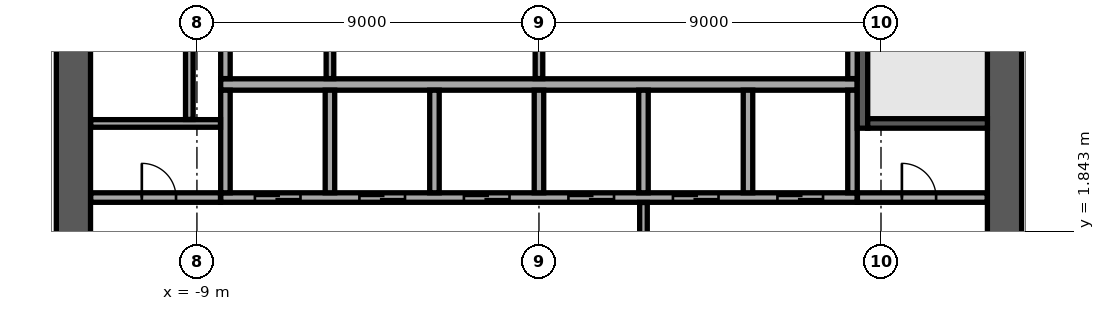
"""IFC4 building model, lengths in metres.
Left out: names, types, materials, properties, quantities, classifications, styles, units other than length and angle.
Written with IfcOpenShell. Run it as: python <this file> out.ifc"""

import sys

from ifc_helpers import new_model, si_unit, direction, frame, frame_2d, origin, place, context, subcontext, project, spatial, rectangle, extrude, element, fill, save


model = new_model("IFC4")
c1 = context("Model", 3, precision=1e-05, world=origin(), true_north=direction((0.0, 1.0)))
c2 = subcontext(c1, "Body", "Model", "MODEL_VIEW")
j1 = project(units=[si_unit("LENGTHUNIT", "METRE"), si_unit("PLANEANGLEUNIT", "RADIAN")], contexts=[c1])
p1 = place(None, origin())
s1 = spatial("IfcSite", under=j1, at=p1, CompositionType="ELEMENT")
p2 = place(p1, origin())
s2 = spatial("IfcBuilding", under=s1, at=p2, CompositionType="ELEMENT")
p3 = place(p2, frame((0.0, 0.0, 205.3)))
s3 = spatial("IfcBuildingStorey", under=s2, at=p3, CompositionType="ELEMENT", Elevation=205.3)
p4 = place(p3, frame((12.25, -11.8, 0.0), z_axis=(0.0, 0.0, 1.0), x_axis=(0.0, 1.0, 0.0)))
e1 = element("IfcWall", 1, at=p4, inside=s3, PredefinedType="SHEAR", context=c2, shape_type="SweptSolid", body=[
    extrude(rectangle(XDim=23.6, YDim=0.9, at=frame_2d((11.8, 0.0))), origin(), (0.0, 0.0, 1.0), 3.62),
])
p5 = place(p4, frame((10.6, 0.0, 0.0)))
e2 = element("IfcOpeningElement", 2, at=p5, cuts=e1, PredefinedType="OPENING", context=c2, shape_type="SweptSolid", body=[
    extrude(rectangle(XDim=2.4, YDim=2.4, at=frame_2d((1.2, 1.2))), frame((0.0, 0.46, 0.0), z_axis=(0.0, -1.0, 0.0), x_axis=(1.0, 0.0, 0.0)), (0.0, 0.0, 1.0), 0.92),
])
p6 = place(p3, frame((-12.25, -11.8, 0.0), z_axis=(0.0, 0.0, 1.0), x_axis=(0.0, 1.0, 0.0)))
e3 = element("IfcWall", 3, at=p6, inside=s3, PredefinedType="SHEAR", context=c2, shape_type="SweptSolid", body=[
    extrude(rectangle(XDim=23.6, YDim=0.9, at=frame_2d((11.8, 0.0))), origin(), (0.0, 0.0, 1.0), 3.62),
])
p7 = place(p6, frame((10.6, 0.0, 0.0)))
e4 = element("IfcOpeningElement", 4, at=p7, cuts=e3, PredefinedType="OPENING", context=c2, shape_type="SweptSolid", body=[
    extrude(rectangle(XDim=2.4, YDim=2.4, at=frame_2d((1.2, 1.2))), frame((0.0, 0.46, 0.0), z_axis=(0.0, -1.0, 0.0), x_axis=(1.0, 0.0, 0.0)), (0.0, 0.0, 1.0), 0.92),
])
p8 = place(p3, frame((-8.375, 5.7, 0.0), z_axis=(0.0, 0.0, 1.0), x_axis=(1.0, 0.0, 0.0)))
e5 = element("IfcWall", 5, at=p8, inside=s3, PredefinedType="SOLIDWALL", context=c2, shape_type="SweptSolid", body=[
    extrude(rectangle(XDim=16.75, YDim=0.3, at=frame_2d((8.375, 0.0))), origin(), (0.0, 0.0, 1.0), 3.62),
])
p9 = place(p3, frame((-8.375, 2.725, 0.0), z_axis=(0.0, 0.0, 1.0), x_axis=(1.0, 0.0, 0.0)))
e6 = element("IfcWall", 6, at=p9, inside=s3, PredefinedType="SOLIDWALL", context=c2, shape_type="SweptSolid", body=[
    extrude(rectangle(XDim=16.75, YDim=0.25, at=frame_2d((8.375, 0.0))), origin(), (0.0, 0.0, 1.0), 3.62),
])
p10 = place(p9, frame((0.9, 0.0, 0.0)))
e7 = element("IfcOpeningElement", 7, at=p10, cuts=e6, PredefinedType="OPENING", context=c2, shape_type="SweptSolid", body=[
    extrude(rectangle(XDim=1.2, YDim=2.1, at=frame_2d((0.6, 1.05))), frame((0.0, 0.135, 0.0), z_axis=(0.0, -1.0, 0.0), x_axis=(1.0, 0.0, 0.0)), (0.0, 0.0, 1.0), 0.27),
])
p11 = place(p9, frame((3.65, 0.0, 0.0)))
e8 = element("IfcOpeningElement", 8, at=p11, cuts=e6, PredefinedType="OPENING", context=c2, shape_type="SweptSolid", body=[
    extrude(rectangle(XDim=1.2, YDim=2.1, at=frame_2d((0.6, 1.05))), frame((0.0, 0.135, 0.0), z_axis=(0.0, -1.0, 0.0), x_axis=(1.0, 0.0, 0.0)), (0.0, 0.0, 1.0), 0.27),
])
p12 = place(p9, frame((6.4, 0.0, 0.0)))
e9 = element("IfcOpeningElement", 9, at=p12, cuts=e6, PredefinedType="OPENING", context=c2, shape_type="SweptSolid", body=[
    extrude(rectangle(XDim=1.2, YDim=2.1, at=frame_2d((0.6, 1.05))), frame((0.0, 0.135, 0.0), z_axis=(0.0, -1.0, 0.0), x_axis=(1.0, 0.0, 0.0)), (0.0, 0.0, 1.0), 0.27),
])
p13 = place(p9, frame((9.15, 0.0, 0.0)))
e10 = element("IfcOpeningElement", 10, at=p13, cuts=e6, PredefinedType="OPENING", context=c2, shape_type="SweptSolid", body=[
    extrude(rectangle(XDim=1.2, YDim=2.1, at=frame_2d((0.6, 1.05))), frame((0.0, 0.135, 0.0), z_axis=(0.0, -1.0, 0.0), x_axis=(1.0, 0.0, 0.0)), (0.0, 0.0, 1.0), 0.27),
])
p14 = place(p9, frame((11.9, 0.0, 0.0)))
e11 = element("IfcOpeningElement", 11, at=p14, cuts=e6, PredefinedType="OPENING", context=c2, shape_type="SweptSolid", body=[
    extrude(rectangle(XDim=1.2, YDim=2.1, at=frame_2d((0.6, 1.05))), frame((0.0, 0.135, 0.0), z_axis=(0.0, -1.0, 0.0), x_axis=(1.0, 0.0, 0.0)), (0.0, 0.0, 1.0), 0.27),
])
p15 = place(p9, frame((14.65, 0.0, 0.0)))
e12 = element("IfcOpeningElement", 12, at=p15, cuts=e6, PredefinedType="OPENING", context=c2, shape_type="SweptSolid", body=[
    extrude(rectangle(XDim=1.2, YDim=2.1, at=frame_2d((0.6, 1.05))), frame((0.0, 0.135, 0.0), z_axis=(0.0, -1.0, 0.0), x_axis=(1.0, 0.0, 0.0)), (0.0, 0.0, 1.0), 0.27),
])
for number, where, z_axis, x_axis in (
    (13, (-8.25, 2.85, 0.0), (0.0, 0.0, 1.0), (0.0, 1.0, 0.0)),
    (14, (-5.5, 2.85, 0.0), (0.0, 0.0, 1.0), (0.0, 1.0, 0.0)),
    (15, (-2.75, 2.85, 0.0), (0.0, 0.0, 1.0), (0.0, 1.0, 0.0)),
    (16, (0.0, 2.85, 0.0), (0.0, 0.0, 1.0), (0.0, 1.0, 0.0)),
    (17, (2.75, 2.85, 0.0), (0.0, 0.0, 1.0), (0.0, 1.0, 0.0)),
    (18, (5.5, 2.85, 0.0), (0.0, 0.0, 1.0), (0.0, 1.0, 0.0)),
    (19, (8.25, 2.85, 0.0), (0.0, 0.0, 1.0), (0.0, 1.0, 0.0)),
):
    element("IfcWall", number, at=place(p3, frame(where, z_axis=z_axis, x_axis=x_axis)), inside=s3, PredefinedType="SOLIDWALL", context=c2, shape_type="SweptSolid", body=[
        extrude(rectangle(XDim=2.7, YDim=0.25, at=frame_2d((1.35, 0.0))), origin(), (0.0, 0.0, 1.0), 3.62),
    ])
p16 = place(p3, frame((8.512, 4.55, 0.0), z_axis=(0.0, 0.0, 1.0), x_axis=(0.0, 1.0, 0.0)))
e20 = element("IfcWall", 20, at=p16, inside=s3, PredefinedType="SOLIDWALL", context=c2, shape_type="SweptSolid", body=[
    extrude(rectangle(XDim=7.25, YDim=0.275, at=frame_2d((3.625, 0.0))), origin(), (0.0, 0.0, 1.0), 3.62),
])
p17 = place(p16, frame((6.0, 0.0, 0.0)))
e21 = element("IfcOpeningElement", 21, at=p17, cuts=e20, PredefinedType="OPENING", context=c2, shape_type="SweptSolid", body=[
    extrude(rectangle(XDim=1.0, YDim=2.1, at=frame_2d((0.5, 1.05))), frame((0.0, 0.147, 0.0), z_axis=(0.0, -1.0, 0.0), x_axis=(1.0, 0.0, 0.0)), (0.0, 0.0, 1.0), 0.295),
])
p18 = place(p3, frame((8.65, 4.675, 0.0), z_axis=(0.0, 0.0, 1.0), x_axis=(1.0, 0.0, 0.0)))
e22 = element("IfcWall", 22, at=p18, inside=s3, PredefinedType="SOLIDWALL", context=c2, shape_type="SweptSolid", body=[
    extrude(rectangle(XDim=3.15, YDim=0.25, at=frame_2d((1.575, 0.0))), origin(), (0.0, 0.0, 1.0), 3.62),
])
p19 = place(p3, frame((2.75, -2.595, 0.0), z_axis=(0.0, 0.0, 1.0), x_axis=(0.0, 1.0, 0.0)))
e23 = element("IfcWall", 23, at=p19, inside=s3, PredefinedType="PARTITIONING", context=c2, shape_type="SweptSolid", body=[
    extrude(rectangle(XDim=5.19, YDim=0.2, at=frame_2d((2.595, 0.0))), origin(), (0.0, 0.0, 1.0), 3.62),
])
p20 = place(p19, frame((1.395, 0.0, 0.0)))
e24 = element("IfcOpeningElement", 24, at=p20, cuts=e23, PredefinedType="OPENING", context=c2, shape_type="SweptSolid", body=[
    extrude(rectangle(XDim=2.4, YDim=2.4, at=frame_2d((1.2, 1.2))), frame((0.0, 0.11, 0.0), z_axis=(0.0, -1.0, 0.0), x_axis=(1.0, 0.0, 0.0)), (0.0, 0.0, 1.0), 0.22),
])
p21 = place(p3, frame((-11.795, 2.725, 0.0), z_axis=(0.0, 0.0, 1.0), x_axis=(1.0, 0.0, 0.0)))
e25 = element("IfcWall", 25, at=p21, inside=s3, PredefinedType="PARTITIONING", context=c2, shape_type="SweptSolid", body=[
    extrude(rectangle(XDim=3.415, YDim=0.25, at=frame_2d((1.708, 0.0))), origin(), (0.0, 0.0, 1.0), 3.62),
])
p22 = place(p21, frame((1.345, 0.0, 0.0)))
e26 = element("IfcOpeningElement", 26, at=p22, cuts=e25, PredefinedType="OPENING", context=c2, shape_type="SweptSolid", body=[
    extrude(rectangle(XDim=0.9, YDim=2.1, at=frame_2d((0.45, 1.05))), frame((0.0, 0.135, 0.0), z_axis=(0.0, -1.0, 0.0), x_axis=(1.0, 0.0, 0.0)), (0.0, 0.0, 1.0), 0.27),
])
p23 = place(p3, frame((8.38, 2.725, 0.0), z_axis=(0.0, 0.0, 1.0), x_axis=(1.0, 0.0, 0.0)))
e27 = element("IfcWall", 27, at=p23, inside=s3, PredefinedType="PARTITIONING", context=c2, shape_type="SweptSolid", body=[
    extrude(rectangle(XDim=3.415, YDim=0.25, at=frame_2d((1.708, 0.0))), origin(), (0.0, 0.0, 1.0), 3.62),
])
p24 = place(p23, frame((1.17, 0.0, 0.0)))
e28 = element("IfcOpeningElement", 28, at=p24, cuts=e27, PredefinedType="OPENING", context=c2, shape_type="SweptSolid", body=[
    extrude(rectangle(XDim=0.9, YDim=2.1, at=frame_2d((0.45, 1.05))), frame((0.0, 0.135, 0.0), z_axis=(0.0, -1.0, 0.0), x_axis=(1.0, 0.0, 0.0)), (0.0, 0.0, 1.0), 0.27),
])
p25 = place(p3, frame((-11.795, 4.675, 0.0), z_axis=(0.0, 0.0, 1.0), x_axis=(1.0, 0.0, 0.0)))
e29 = element("IfcWall", 29, at=p25, inside=s3, PredefinedType="PARTITIONING", context=c2, shape_type="SweptSolid", body=[
    extrude(rectangle(XDim=3.415, YDim=0.2, at=frame_2d((1.708, 0.0))), origin(), (0.0, 0.0, 1.0), 3.62),
])
p26 = place(p3, frame((-9.2, 4.78, 0.0), z_axis=(0.0, 0.0, 1.0), x_axis=(0.0, 1.0, 0.0)))
e30 = element("IfcWall", 30, at=p26, inside=s3, PredefinedType="PARTITIONING", context=c2, shape_type="SweptSolid", body=[
    extrude(rectangle(XDim=7.015, YDim=0.2, at=frame_2d((3.507, 0.0))), origin(), (0.0, 0.0, 1.0), 3.62),
])
p27 = place(p26, frame((2.92, 0.0, 0.0)))
e31 = element("IfcOpeningElement", 31, at=p27, cuts=e30, PredefinedType="OPENING", context=c2, shape_type="SweptSolid", body=[
    extrude(rectangle(XDim=1.0, YDim=2.1, at=frame_2d((0.5, 1.05))), frame((0.0, 0.11, 0.0), z_axis=(0.0, -1.0, 0.0), x_axis=(1.0, 0.0, 0.0)), (0.0, 0.0, 1.0), 0.22),
])
p28 = place(p3, frame((-8.25, 5.855, 0.0), z_axis=(0.0, 0.0, 1.0), x_axis=(0.0, 1.0, 0.0)))
e32 = element("IfcWall", 32, at=p28, inside=s3, PredefinedType="PARTITIONING", context=c2, shape_type="SweptSolid", body=[
    extrude(rectangle(XDim=2.69, YDim=0.25, at=frame_2d((1.345, 0.0))), origin(), (0.0, 0.0, 1.0), 3.62),
])
for number, where, z_axis, x_axis in (
    (33, (-5.5, 5.855, 0.0), (0.0, 0.0, 1.0), (0.0, 1.0, 0.0)),
    (34, (0.0, 5.855, 0.0), (0.0, 0.0, 1.0), (0.0, 1.0, 0.0)),
):
    element("IfcWall", number, at=place(p3, frame(where, z_axis=z_axis, x_axis=x_axis)), inside=s3, PredefinedType="PARTITIONING", context=c2, shape_type="SweptSolid", body=[
        extrude(rectangle(XDim=2.69, YDim=0.2, at=frame_2d((1.345, 0.0))), origin(), (0.0, 0.0, 1.0), 3.62),
    ])
p29 = place(p3, frame((8.25, 5.855, 0.0), z_axis=(0.0, 0.0, 1.0), x_axis=(0.0, 1.0, 0.0)))
e35 = element("IfcWall", 35, at=p29, inside=s3, PredefinedType="PARTITIONING", context=c2, shape_type="SweptSolid", body=[
    extrude(rectangle(XDim=2.69, YDim=0.25, at=frame_2d((1.345, 0.0))), origin(), (0.0, 0.0, 1.0), 3.62),
])
p30 = place(p3, frame((-0.749, 34.782, 0.0), z_axis=(0.0, 0.0, 1.0), x_axis=(-0.694657553534, -0.719340589233, 0.0)))
e36 = element("IfcWall", 36, at=p30, inside=s3, PredefinedType="STANDARD", context=c2, shape_type="SweptSolid", body=[
    extrude(rectangle(XDim=49.0, YDim=0.6, at=frame_2d((24.5, 0.0))), origin(), (0.0, 0.0, 1.0), 3.62),
])
p31 = place(p30, frame((1.227, 0.0, 0.9)))
e37 = element("IfcOpeningElement", 37, at=p31, cuts=e36, PredefinedType="OPENING", context=c2, shape_type="SweptSolid", body=[
    extrude(rectangle(XDim=2.0, YDim=2.1, at=frame_2d((1.0, 1.05))), frame((0.0, 0.31, 0.0), z_axis=(0.0, -1.0, 0.0), x_axis=(1.0, 0.0, 0.0)), (0.0, 0.0, 1.0), 0.62),
])
p32 = place(p30, frame((5.682, 0.0, 0.9)))
e38 = element("IfcOpeningElement", 38, at=p32, cuts=e36, PredefinedType="OPENING", context=c2, shape_type="SweptSolid", body=[
    extrude(rectangle(XDim=2.0, YDim=2.1, at=frame_2d((1.0, 1.05))), frame((0.0, 0.31, 0.0), z_axis=(0.0, -1.0, 0.0), x_axis=(1.0, 0.0, 0.0)), (0.0, 0.0, 1.0), 0.62),
])
p33 = place(p30, frame((10.136, 0.0, 0.9)))
e39 = element("IfcOpeningElement", 39, at=p33, cuts=e36, PredefinedType="OPENING", context=c2, shape_type="SweptSolid", body=[
    extrude(rectangle(XDim=2.0, YDim=2.1, at=frame_2d((1.0, 1.05))), frame((0.0, 0.31, 0.0), z_axis=(0.0, -1.0, 0.0), x_axis=(1.0, 0.0, 0.0)), (0.0, 0.0, 1.0), 0.62),
])
p34 = place(p30, frame((14.591, 0.0, 0.9)))
e40 = element("IfcOpeningElement", 40, at=p34, cuts=e36, PredefinedType="OPENING", context=c2, shape_type="SweptSolid", body=[
    extrude(rectangle(XDim=2.0, YDim=2.1, at=frame_2d((1.0, 1.05))), frame((0.0, 0.31, 0.0), z_axis=(0.0, -1.0, 0.0), x_axis=(1.0, 0.0, 0.0)), (0.0, 0.0, 1.0), 0.62),
])
p35 = place(p30, frame((19.045, 0.0, 0.9)))
e41 = element("IfcOpeningElement", 41, at=p35, cuts=e36, PredefinedType="OPENING", context=c2, shape_type="SweptSolid", body=[
    extrude(rectangle(XDim=2.0, YDim=2.1, at=frame_2d((1.0, 1.05))), frame((0.0, 0.31, 0.0), z_axis=(0.0, -1.0, 0.0), x_axis=(1.0, 0.0, 0.0)), (0.0, 0.0, 1.0), 0.62),
])
p36 = place(p30, frame((23.5, 0.0, 0.9)))
e42 = element("IfcOpeningElement", 42, at=p36, cuts=e36, PredefinedType="OPENING", context=c2, shape_type="SweptSolid", body=[
    extrude(rectangle(XDim=2.0, YDim=2.1, at=frame_2d((1.0, 1.05))), frame((0.0, 0.31, 0.0), z_axis=(0.0, -1.0, 0.0), x_axis=(1.0, 0.0, 0.0)), (0.0, 0.0, 1.0), 0.62),
])
p37 = place(p30, frame((27.955, 0.0, 0.9)))
e43 = element("IfcOpeningElement", 43, at=p37, cuts=e36, PredefinedType="OPENING", context=c2, shape_type="SweptSolid", body=[
    extrude(rectangle(XDim=2.0, YDim=2.1, at=frame_2d((1.0, 1.05))), frame((0.0, 0.31, 0.0), z_axis=(0.0, -1.0, 0.0), x_axis=(1.0, 0.0, 0.0)), (0.0, 0.0, 1.0), 0.62),
])
p38 = place(p30, frame((32.409, 0.0, 0.9)))
e44 = element("IfcOpeningElement", 44, at=p38, cuts=e36, PredefinedType="OPENING", context=c2, shape_type="SweptSolid", body=[
    extrude(rectangle(XDim=2.0, YDim=2.1, at=frame_2d((1.0, 1.05))), frame((0.0, 0.31, 0.0), z_axis=(0.0, -1.0, 0.0), x_axis=(1.0, 0.0, 0.0)), (0.0, 0.0, 1.0), 0.62),
])
p39 = place(p30, frame((36.864, 0.0, 0.9)))
e45 = element("IfcOpeningElement", 45, at=p39, cuts=e36, PredefinedType="OPENING", context=c2, shape_type="SweptSolid", body=[
    extrude(rectangle(XDim=2.0, YDim=2.1, at=frame_2d((1.0, 1.05))), frame((0.0, 0.31, 0.0), z_axis=(0.0, -1.0, 0.0), x_axis=(1.0, 0.0, 0.0)), (0.0, 0.0, 1.0), 0.62),
])
p40 = place(p30, frame((41.318, 0.0, 0.9)))
e46 = element("IfcOpeningElement", 46, at=p40, cuts=e36, PredefinedType="OPENING", context=c2, shape_type="SweptSolid", body=[
    extrude(rectangle(XDim=2.0, YDim=2.1, at=frame_2d((1.0, 1.05))), frame((0.0, 0.31, 0.0), z_axis=(0.0, -1.0, 0.0), x_axis=(1.0, 0.0, 0.0)), (0.0, 0.0, 1.0), 0.62),
])
p41 = place(p30, frame((45.773, 0.0, 0.9)))
e47 = element("IfcOpeningElement", 47, at=p41, cuts=e36, PredefinedType="OPENING", context=c2, shape_type="SweptSolid", body=[
    extrude(rectangle(XDim=2.0, YDim=2.1, at=frame_2d((1.0, 1.05))), frame((0.0, 0.31, 0.0), z_axis=(0.0, -1.0, 0.0), x_axis=(1.0, 0.0, 0.0)), (0.0, 0.0, 1.0), 0.62),
])
p42 = place(p3, frame((-26.96, -0.016, 0.0), z_axis=(0.0, 0.0, 1.0), x_axis=(0.694654845656, 0.719343204184, 0.0)))
e48 = element("IfcWall", 48, at=p42, inside=s3, PredefinedType="PARTITIONING", context=c2, shape_type="SweptSolid", body=[
    extrude(rectangle(XDim=37.479, YDim=0.15, at=frame_2d((18.74, 0.0))), origin(), (0.0, 0.0, 1.0), 2.97),
])
p43 = place(p42, frame((4.3, 0.0, 0.0)))
e49 = element("IfcOpeningElement", 49, at=p43, cuts=e48, PredefinedType="OPENING", context=c2, shape_type="SweptSolid", body=[
    extrude(rectangle(XDim=1.8, YDim=2.1, at=frame_2d((0.9, 1.05))), frame((0.0, 0.085, 0.0), z_axis=(0.0, -1.0, 0.0), x_axis=(1.0, 0.0, 0.0)), (0.0, 0.0, 1.0), 0.17),
])
p44 = place(p42, frame((15.547, 0.0, 0.0)))
e50 = element("IfcOpeningElement", 50, at=p44, cuts=e48, PredefinedType="OPENING", context=c2, shape_type="SweptSolid", body=[
    extrude(rectangle(XDim=1.0, YDim=2.1, at=frame_2d((0.5, 1.05))), frame((0.0, 0.085, 0.0), z_axis=(0.0, -1.0, 0.0), x_axis=(1.0, 0.0, 0.0)), (0.0, 0.0, 1.0), 0.17),
])
p45 = place(p42, frame((22.58, 0.0, 0.0)))
e51 = element("IfcOpeningElement", 51, at=p45, cuts=e48, PredefinedType="OPENING", context=c2, shape_type="SweptSolid", body=[
    extrude(rectangle(XDim=1.0, YDim=2.1, at=frame_2d((0.5, 1.05))), frame((0.0, 0.085, 0.0), z_axis=(0.0, -1.0, 0.0), x_axis=(1.0, 0.0, 0.0)), (0.0, 0.0, 1.0), 0.17),
])
p46 = place(p42, frame((35.508, 0.0, 0.0)))
e52 = element("IfcOpeningElement", 52, at=p46, cuts=e48, PredefinedType="OPENING", context=c2, shape_type="SweptSolid", body=[
    extrude(rectangle(XDim=1.0, YDim=2.1, at=frame_2d((0.5, 1.05))), frame((0.0, 0.085, 0.0), z_axis=(0.0, -1.0, 0.0), x_axis=(1.0, 0.0, 0.0)), (0.0, 0.0, 1.0), 0.17),
])
p47 = place(p3, frame((5.597, 25.362, 0.0), z_axis=(0.0, 0.0, 1.0), x_axis=(0.719350067003, -0.69464773886, 0.0)))
e53 = element("IfcWall", 53, at=p47, inside=s3, PredefinedType="PARTITIONING", context=c2, shape_type="SweptSolid", body=[
    extrude(rectangle(XDim=27.258, YDim=0.15, at=frame_2d((13.629, 0.0))), origin(), (0.0, 0.0, 1.0), 3.17),
])
p48 = place(p47, frame((11.017, 0.0, 0.0)))
e54 = element("IfcOpeningElement", 54, at=p48, cuts=e53, PredefinedType="OPENING", context=c2, shape_type="SweptSolid", body=[
    extrude(rectangle(XDim=1.0, YDim=2.1, at=frame_2d((0.5, 1.05))), frame((0.0, 0.085, 0.0), z_axis=(0.0, -1.0, 0.0), x_axis=(1.0, 0.0, 0.0)), (0.0, 0.0, 1.0), 0.17),
])
p49 = place(p47, frame((16.287, 0.0, 0.0)))
e55 = element("IfcOpeningElement", 55, at=p49, cuts=e53, PredefinedType="OPENING", context=c2, shape_type="SweptSolid", body=[
    extrude(rectangle(XDim=1.0, YDim=2.1, at=frame_2d((0.5, 1.05))), frame((0.0, 0.085, 0.0), z_axis=(0.0, -1.0, 0.0), x_axis=(1.0, 0.0, 0.0)), (0.0, 0.0, 1.0), 0.17),
])
p50 = place(p47, frame((24.435, 0.0, 0.0)))
e56 = element("IfcOpeningElement", 56, at=p50, cuts=e53, PredefinedType="OPENING", context=c2, shape_type="SweptSolid", body=[
    extrude(rectangle(XDim=1.8, YDim=2.1, at=frame_2d((0.9, 1.05))), frame((0.0, 0.085, 0.0), z_axis=(0.0, -1.0, 0.0), x_axis=(1.0, 0.0, 0.0)), (0.0, 0.0, 1.0), 0.17),
])
p51 = place(p10, origin())
e57 = element("IfcDoor", 57, at=p51, inside=s3, OperationType="DOUBLE_DOOR_SLIDING", PredefinedType="DOOR", context=c2, shape_type="SweptSolid", body=[
    extrude(rectangle(XDim=1.2, YDim=2.1, at=frame_2d((0.6, 1.05))), frame((0.0, 0.025, 0.0), z_axis=(0.0, -1.0, 0.0), x_axis=(1.0, 0.0, 0.0)), (0.0, 0.0, 1.0), 0.05),
])
fill(e7, e57)
p52 = place(p11, origin())
e58 = element("IfcDoor", 58, at=p52, inside=s3, OperationType="DOUBLE_DOOR_SLIDING", PredefinedType="DOOR", context=c2, shape_type="SweptSolid", body=[
    extrude(rectangle(XDim=1.2, YDim=2.1, at=frame_2d((0.6, 1.05))), frame((0.0, 0.025, 0.0), z_axis=(0.0, -1.0, 0.0), x_axis=(1.0, 0.0, 0.0)), (0.0, 0.0, 1.0), 0.05),
])
fill(e8, e58)
p53 = place(p12, origin())
e59 = element("IfcDoor", 59, at=p53, inside=s3, OperationType="DOUBLE_DOOR_SLIDING", PredefinedType="DOOR", context=c2, shape_type="SweptSolid", body=[
    extrude(rectangle(XDim=1.2, YDim=2.1, at=frame_2d((0.6, 1.05))), frame((0.0, 0.025, 0.0), z_axis=(0.0, -1.0, 0.0), x_axis=(1.0, 0.0, 0.0)), (0.0, 0.0, 1.0), 0.05),
])
fill(e9, e59)
p54 = place(p13, origin())
e60 = element("IfcDoor", 60, at=p54, inside=s3, OperationType="DOUBLE_DOOR_SLIDING", PredefinedType="DOOR", context=c2, shape_type="SweptSolid", body=[
    extrude(rectangle(XDim=1.2, YDim=2.1, at=frame_2d((0.6, 1.05))), frame((0.0, 0.025, 0.0), z_axis=(0.0, -1.0, 0.0), x_axis=(1.0, 0.0, 0.0)), (0.0, 0.0, 1.0), 0.05),
])
fill(e10, e60)
p55 = place(p14, origin())
e61 = element("IfcDoor", 61, at=p55, inside=s3, OperationType="DOUBLE_DOOR_SLIDING", PredefinedType="DOOR", context=c2, shape_type="SweptSolid", body=[
    extrude(rectangle(XDim=1.2, YDim=2.1, at=frame_2d((0.6, 1.05))), frame((0.0, 0.025, 0.0), z_axis=(0.0, -1.0, 0.0), x_axis=(1.0, 0.0, 0.0)), (0.0, 0.0, 1.0), 0.05),
])
fill(e11, e61)
p56 = place(p15, origin())
e62 = element("IfcDoor", 62, at=p56, inside=s3, OperationType="DOUBLE_DOOR_SLIDING", PredefinedType="DOOR", context=c2, shape_type="SweptSolid", body=[
    extrude(rectangle(XDim=1.2, YDim=2.1, at=frame_2d((0.6, 1.05))), frame((0.0, 0.025, 0.0), z_axis=(0.0, -1.0, 0.0), x_axis=(1.0, 0.0, 0.0)), (0.0, 0.0, 1.0), 0.05),
])
fill(e12, e62)
p57 = place(p24, origin())
e63 = element("IfcDoor", 63, at=p57, inside=s3, OperationType="SINGLE_SWING_LEFT", PredefinedType="DOOR", context=c2, shape_type="SweptSolid", body=[
    extrude(rectangle(XDim=0.9, YDim=2.1, at=frame_2d((0.45, 1.05))), frame((0.0, 0.025, 0.0), z_axis=(0.0, -1.0, 0.0), x_axis=(1.0, 0.0, 0.0)), (0.0, 0.0, 1.0), 0.05),
])
fill(e28, e63)
p58 = place(p22, origin())
e64 = element("IfcDoor", 64, at=p58, inside=s3, OperationType="SINGLE_SWING_LEFT", PredefinedType="DOOR", context=c2, shape_type="SweptSolid", body=[
    extrude(rectangle(XDim=0.9, YDim=2.1, at=frame_2d((0.45, 1.05))), frame((0.0, 0.025, 0.0), z_axis=(0.0, -1.0, 0.0), x_axis=(1.0, 0.0, 0.0)), (0.0, 0.0, 1.0), 0.05),
])
fill(e26, e64)
save(model, sys.argv[1])
